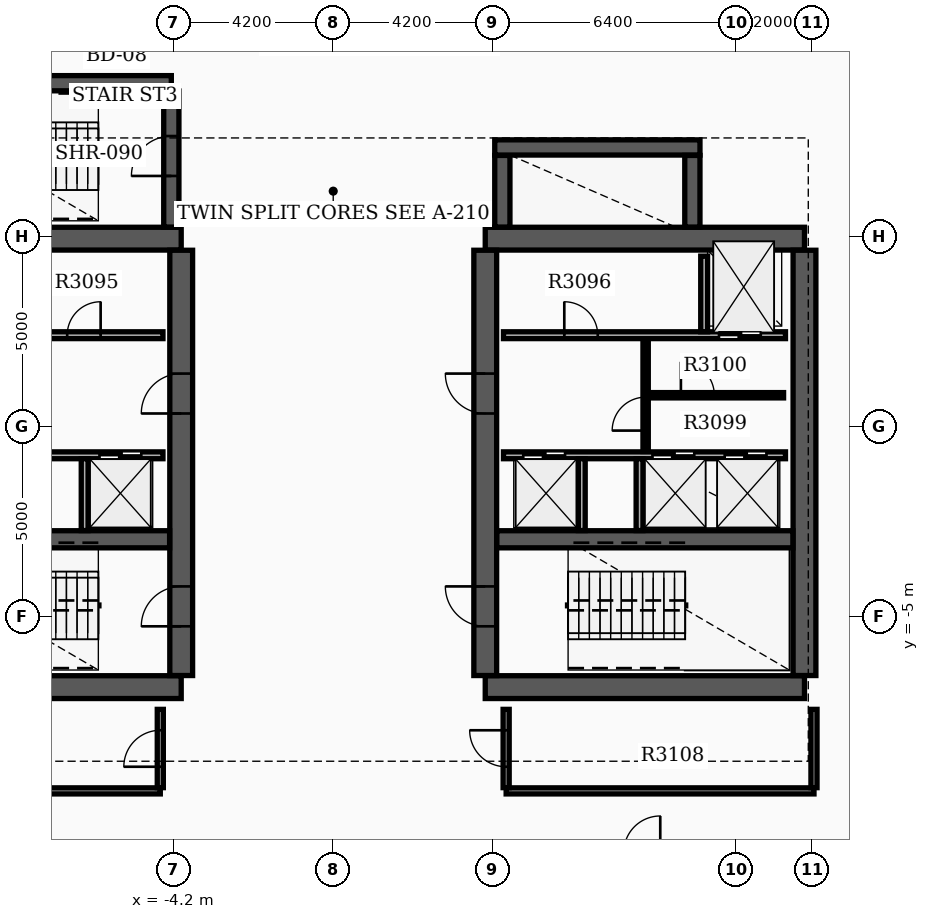
"""IFC4 building model, lengths in metres.
Left out: names, types, materials, properties, quantities, classifications, styles, units other than length and angle.
Written with IfcOpenShell. Run it as: python <this file> out.ifc"""

import sys

from ifc_helpers import new_model, si_unit, direction, frame, frame_2d, origin, place, context, subcontext, project, spatial, rectangle, extrude, element, fill, save


model = new_model("IFC4")
c1 = context("Model", 3, precision=1e-05, world=origin(), true_north=direction((0.0, 1.0)))
c2 = subcontext(c1, "Body", "Model", "MODEL_VIEW")
j1 = project(units=[si_unit("LENGTHUNIT", "METRE"), si_unit("PLANEANGLEUNIT", "RADIAN")], contexts=[c1])
p1 = place(None, origin())
s1 = spatial("IfcSite", under=j1, at=p1, CompositionType="ELEMENT")
p2 = place(p1, origin())
s2 = spatial("IfcBuilding", under=s1, at=p2, CompositionType="ELEMENT")
p3 = place(p2, frame((0.0, 0.0, 196.8)))
s3 = spatial("IfcBuildingStorey", under=s2, at=p3, CompositionType="ELEMENT", Elevation=196.8)
for number, where, z_axis, x_axis in (
    (1, (-12.4, -6.85, 0.0), (0.0, 0.0, 1.0), (1.0, 0.0, 0.0)),
    (2, (-12.4, 4.95, 0.0), (0.0, 0.0, 1.0), (1.0, 0.0, 0.0)),
):
    element("IfcWall", number, at=place(p3, frame(where, z_axis=z_axis, x_axis=x_axis)), inside=s3, PredefinedType="SHEAR", context=c2, shape_type="SweptSolid", body=[
        extrude(rectangle(XDim=8.4, YDim=0.6, at=frame_2d((4.2, 0.0))), origin(), (0.0, 0.0, 1.0), 4.3),
    ])
p4 = place(p3, frame((-4.0, -6.545, 0.0), z_axis=(0.0, 0.0, 1.0), x_axis=(0.0, 1.0, 0.0)))
e3 = element("IfcWall", 3, at=p4, inside=s3, PredefinedType="SHEAR", context=c2, shape_type="SweptSolid", body=[
    extrude(rectangle(XDim=11.19, YDim=0.6, at=frame_2d((5.595, 0.0))), origin(), (0.0, 0.0, 1.0), 4.3),
])
p5 = place(p4, frame((1.295, 0.0, 0.0)))
e4 = element("IfcOpeningElement", 4, at=p5, cuts=e3, PredefinedType="OPENING", context=c2, shape_type="SweptSolid", body=[
    extrude(rectangle(XDim=1.05, YDim=2.15, at=frame_2d((0.525, 1.075))), frame((0.0, 0.31, 0.0), z_axis=(0.0, -1.0, 0.0), x_axis=(1.0, 0.0, 0.0)), (0.0, 0.0, 1.0), 0.62),
])
p6 = place(p4, frame((6.895, 0.0, 0.0)))
e5 = element("IfcOpeningElement", 5, at=p6, cuts=e3, PredefinedType="OPENING", context=c2, shape_type="SweptSolid", body=[
    extrude(rectangle(XDim=1.05, YDim=2.15, at=frame_2d((0.525, 1.075))), frame((0.0, 0.31, 0.0), z_axis=(0.0, -1.0, 0.0), x_axis=(1.0, 0.0, 0.0)), (0.0, 0.0, 1.0), 0.62),
])
p7 = place(p3, frame((-12.095, -2.96, 0.0), z_axis=(0.0, 0.0, 1.0), x_axis=(1.0, 0.0, 0.0)))
e6 = element("IfcWall", 6, at=p7, inside=s3, PredefinedType="SHEAR", context=c2, shape_type="SweptSolid", body=[
    extrude(rectangle(XDim=7.79, YDim=0.45, at=frame_2d((3.895, 0.0))), origin(), (0.0, 0.0, 1.0), 4.3),
])
for number, where, z_axis, x_axis in (
    (7, (4.0, -6.85, 0.0), (0.0, 0.0, 1.0), (1.0, 0.0, 0.0)),
    (8, (4.0, 4.95, 0.0), (0.0, 0.0, 1.0), (1.0, 0.0, 0.0)),
):
    element("IfcWall", number, at=place(p3, frame(where, z_axis=z_axis, x_axis=x_axis)), inside=s3, PredefinedType="SHEAR", context=c2, shape_type="SweptSolid", body=[
        extrude(rectangle(XDim=8.4, YDim=0.6, at=frame_2d((4.2, 0.0))), origin(), (0.0, 0.0, 1.0), 4.3),
    ])
p8 = place(p3, frame((4.0, -6.545, 0.0), z_axis=(0.0, 0.0, 1.0), x_axis=(0.0, 1.0, 0.0)))
e9 = element("IfcWall", 9, at=p8, inside=s3, PredefinedType="SHEAR", context=c2, shape_type="SweptSolid", body=[
    extrude(rectangle(XDim=11.19, YDim=0.6, at=frame_2d((5.595, 0.0))), origin(), (0.0, 0.0, 1.0), 4.3),
])
p9 = place(p8, frame((1.295, 0.0, 0.0)))
e10 = element("IfcOpeningElement", 10, at=p9, cuts=e9, PredefinedType="OPENING", context=c2, shape_type="SweptSolid", body=[
    extrude(rectangle(XDim=1.05, YDim=2.15, at=frame_2d((0.525, 1.075))), frame((0.0, 0.31, 0.0), z_axis=(0.0, -1.0, 0.0), x_axis=(1.0, 0.0, 0.0)), (0.0, 0.0, 1.0), 0.62),
])
p10 = place(p8, frame((6.895, 0.0, 0.0)))
e11 = element("IfcOpeningElement", 11, at=p10, cuts=e9, PredefinedType="OPENING", context=c2, shape_type="SweptSolid", body=[
    extrude(rectangle(XDim=1.05, YDim=2.15, at=frame_2d((0.525, 1.075))), frame((0.0, 0.31, 0.0), z_axis=(0.0, -1.0, 0.0), x_axis=(1.0, 0.0, 0.0)), (0.0, 0.0, 1.0), 0.62),
])
p11 = place(p3, frame((12.4, -6.545, 0.0), z_axis=(0.0, 0.0, 1.0), x_axis=(0.0, 1.0, 0.0)))
e12 = element("IfcWall", 12, at=p11, inside=s3, PredefinedType="SHEAR", context=c2, shape_type="SweptSolid", body=[
    extrude(rectangle(XDim=11.19, YDim=0.6, at=frame_2d((5.595, 0.0))), origin(), (0.0, 0.0, 1.0), 4.3),
])
p12 = place(p3, frame((4.305, -2.96, 0.0), z_axis=(0.0, 0.0, 1.0), x_axis=(1.0, 0.0, 0.0)))
e13 = element("IfcWall", 13, at=p12, inside=s3, PredefinedType="SHEAR", context=c2, shape_type="SweptSolid", body=[
    extrude(rectangle(XDim=7.79, YDim=0.45, at=frame_2d((3.895, 0.0))), origin(), (0.0, 0.0, 1.0), 4.3),
])
p13 = place(p3, frame((-12.22, 9.04, 0.0), z_axis=(0.0, 0.0, 1.0), x_axis=(1.0, 0.0, 0.0)))
e14 = element("IfcWall", 14, at=p13, inside=s3, PredefinedType="SHEAR", context=c2, shape_type="SweptSolid", body=[
    extrude(rectangle(XDim=7.96, YDim=0.4, at=frame_2d((3.98, 0.0))), origin(), (0.0, 0.0, 1.0), 4.3),
])
p14 = place(p3, frame((-4.26, 5.255, 0.0), z_axis=(0.0, 0.0, 1.0), x_axis=(0.0, 1.0, 0.0)))
e15 = element("IfcWall", 15, at=p14, inside=s3, PredefinedType="SHEAR", context=c2, shape_type="SweptSolid", body=[
    extrude(rectangle(XDim=3.58, YDim=0.4, at=frame_2d((1.79, 0.0))), origin(), (0.0, 0.0, 1.0), 4.3),
])
p15 = place(p14, frame((1.345, 0.0, 0.0)))
e16 = element("IfcOpeningElement", 16, at=p15, cuts=e15, PredefinedType="OPENING", context=c2, shape_type="SweptSolid", body=[
    extrude(rectangle(XDim=1.05, YDim=2.15, at=frame_2d((0.525, 1.075))), frame((0.0, 0.21, 0.0), z_axis=(0.0, -1.0, 0.0), x_axis=(1.0, 0.0, 0.0)), (0.0, 0.0, 1.0), 0.42),
])
p16 = place(p3, frame((4.45, 5.255, 0.0), z_axis=(0.0, 0.0, 1.0), x_axis=(0.0, 1.0, 0.0)))
e17 = element("IfcWall", 17, at=p16, inside=s3, PredefinedType="SHEAR", context=c2, shape_type="SweptSolid", body=[
    extrude(rectangle(XDim=1.885, YDim=0.4, at=frame_2d((0.942, 0.0))), origin(), (0.0, 0.0, 1.0), 4.3),
])
p17 = place(p3, frame((4.25, 7.35, 0.0), z_axis=(0.0, 0.0, 1.0), x_axis=(1.0, 0.0, 0.0)))
e18 = element("IfcWall", 18, at=p17, inside=s3, PredefinedType="SHEAR", context=c2, shape_type="SweptSolid", body=[
    extrude(rectangle(XDim=5.4, YDim=0.4, at=frame_2d((2.7, 0.0))), origin(), (0.0, 0.0, 1.0), 4.3),
])
p18 = place(p3, frame((9.45, 5.255, 0.0), z_axis=(0.0, 0.0, 1.0), x_axis=(0.0, 1.0, 0.0)))
e19 = element("IfcWall", 19, at=p18, inside=s3, PredefinedType="SHEAR", context=c2, shape_type="SweptSolid", body=[
    extrude(rectangle(XDim=1.885, YDim=0.4, at=frame_2d((0.942, 0.0))), origin(), (0.0, 0.0, 1.0), 4.3),
])
p19 = place(p3, frame((-11.9, 2.41, 0.0), z_axis=(0.0, 0.0, 1.0), x_axis=(1.0, 0.0, 0.0)))
e20 = element("IfcWall", 20, at=p19, inside=s3, PredefinedType="SOLIDWALL", context=c2, shape_type="SweptSolid", body=[
    extrude(rectangle(XDim=7.42, YDim=0.18, at=frame_2d((3.71, 0.0))), origin(), (0.0, 0.0, 1.0), 3.37),
])
p20 = place(p19, frame((0.55, 0.0, 0.0)))
e21 = element("IfcOpeningElement", 21, at=p20, cuts=e20, PredefinedType="OPENING", context=c2, shape_type="SweptSolid", body=[
    extrude(rectangle(XDim=1.1, YDim=2.15, at=frame_2d((0.55, 1.075))), frame((0.0, 0.1, 0.0), z_axis=(0.0, -1.0, 0.0), x_axis=(1.0, 0.0, 0.0)), (0.0, 0.0, 1.0), 0.2),
])
p21 = place(p19, frame((4.9, 0.0, 0.0)))
e22 = element("IfcOpeningElement", 22, at=p21, cuts=e20, PredefinedType="OPENING", context=c2, shape_type="SweptSolid", body=[
    extrude(rectangle(XDim=0.88, YDim=2.1, at=frame_2d((0.44, 1.05))), frame((0.0, 0.1, 0.0), z_axis=(0.0, -1.0, 0.0), x_axis=(1.0, 0.0, 0.0)), (0.0, 0.0, 1.0), 0.2),
])
p22 = place(p3, frame((4.48, 2.41, 0.0), z_axis=(0.0, 0.0, 1.0), x_axis=(1.0, 0.0, 0.0)))
e23 = element("IfcWall", 23, at=p22, inside=s3, PredefinedType="SOLIDWALL", context=c2, shape_type="SweptSolid", body=[
    extrude(rectangle(XDim=7.42, YDim=0.18, at=frame_2d((3.71, 0.0))), origin(), (0.0, 0.0, 1.0), 3.37),
])
p23 = place(p22, frame((5.67, 0.0, 0.0)))
e24 = element("IfcOpeningElement", 24, at=p23, cuts=e23, PredefinedType="OPENING", context=c2, shape_type="SweptSolid", body=[
    extrude(rectangle(XDim=1.1, YDim=2.15, at=frame_2d((0.55, 1.075))), frame((0.0, 0.1, 0.0), z_axis=(0.0, -1.0, 0.0), x_axis=(1.0, 0.0, 0.0)), (0.0, 0.0, 1.0), 0.2),
])
p24 = place(p22, frame((1.6, 0.0, 0.0)))
e25 = element("IfcOpeningElement", 25, at=p24, cuts=e23, PredefinedType="OPENING", context=c2, shape_type="SweptSolid", body=[
    extrude(rectangle(XDim=0.88, YDim=2.1, at=frame_2d((0.44, 1.05))), frame((0.0, 0.1, 0.0), z_axis=(0.0, -1.0, 0.0), x_axis=(1.0, 0.0, 0.0)), (0.0, 0.0, 1.0), 0.2),
])
p25 = place(p3, frame((-11.9, -0.75, 0.0), z_axis=(0.0, 0.0, 1.0), x_axis=(1.0, 0.0, 0.0)))
e26 = element("IfcWall", 26, at=p25, inside=s3, PredefinedType="SOLIDWALL", context=c2, shape_type="SweptSolid", body=[
    extrude(rectangle(XDim=7.42, YDim=0.18, at=frame_2d((3.71, 0.0))), origin(), (0.0, 0.0, 1.0), 3.37),
])
p26 = place(p25, frame((0.45, 0.0, 0.0)))
e27 = element("IfcOpeningElement", 27, at=p26, cuts=e26, PredefinedType="OPENING", context=c2, shape_type="SweptSolid", body=[
    extrude(rectangle(XDim=1.1, YDim=2.15, at=frame_2d((0.55, 1.075))), frame((0.0, 0.1, 0.0), z_axis=(0.0, -1.0, 0.0), x_axis=(1.0, 0.0, 0.0)), (0.0, 0.0, 1.0), 0.2),
])
p27 = place(p25, frame((2.35, 0.0, 0.0)))
e28 = element("IfcOpeningElement", 28, at=p27, cuts=e26, PredefinedType="OPENING", context=c2, shape_type="SweptSolid", body=[
    extrude(rectangle(XDim=1.1, YDim=2.15, at=frame_2d((0.55, 1.075))), frame((0.0, 0.1, 0.0), z_axis=(0.0, -1.0, 0.0), x_axis=(1.0, 0.0, 0.0)), (0.0, 0.0, 1.0), 0.2),
])
p28 = place(p25, frame((5.75, 0.0, 0.0)))
e29 = element("IfcOpeningElement", 29, at=p28, cuts=e26, PredefinedType="OPENING", context=c2, shape_type="SweptSolid", body=[
    extrude(rectangle(XDim=1.1, YDim=2.15, at=frame_2d((0.55, 1.075))), frame((0.0, 0.1, 0.0), z_axis=(0.0, -1.0, 0.0), x_axis=(1.0, 0.0, 0.0)), (0.0, 0.0, 1.0), 0.2),
])
p29 = place(p3, frame((4.48, -0.75, 0.0), z_axis=(0.0, 0.0, 1.0), x_axis=(1.0, 0.0, 0.0)))
e30 = element("IfcWall", 30, at=p29, inside=s3, PredefinedType="SOLIDWALL", context=c2, shape_type="SweptSolid", body=[
    extrude(rectangle(XDim=7.42, YDim=0.18, at=frame_2d((3.71, 0.0))), origin(), (0.0, 0.0, 1.0), 3.37),
])
p30 = place(p29, frame((0.52, 0.0, 0.0)))
e31 = element("IfcOpeningElement", 31, at=p30, cuts=e30, PredefinedType="OPENING", context=c2, shape_type="SweptSolid", body=[
    extrude(rectangle(XDim=1.1, YDim=2.15, at=frame_2d((0.55, 1.075))), frame((0.0, 0.1, 0.0), z_axis=(0.0, -1.0, 0.0), x_axis=(1.0, 0.0, 0.0)), (0.0, 0.0, 1.0), 0.2),
])
p31 = place(p29, frame((3.92, 0.0, 0.0)))
e32 = element("IfcOpeningElement", 32, at=p31, cuts=e30, PredefinedType="OPENING", context=c2, shape_type="SweptSolid", body=[
    extrude(rectangle(XDim=1.1, YDim=2.15, at=frame_2d((0.55, 1.075))), frame((0.0, 0.1, 0.0), z_axis=(0.0, -1.0, 0.0), x_axis=(1.0, 0.0, 0.0)), (0.0, 0.0, 1.0), 0.2),
])
p32 = place(p29, frame((5.82, 0.0, 0.0)))
e33 = element("IfcOpeningElement", 33, at=p32, cuts=e30, PredefinedType="OPENING", context=c2, shape_type="SweptSolid", body=[
    extrude(rectangle(XDim=1.1, YDim=2.15, at=frame_2d((0.55, 1.075))), frame((0.0, 0.1, 0.0), z_axis=(0.0, -1.0, 0.0), x_axis=(1.0, 0.0, 0.0)), (0.0, 0.0, 1.0), 0.2),
])
p33 = place(p3, frame((9.76, 2.5, 0.0), z_axis=(0.0, 0.0, 1.0), x_axis=(0.0, 1.0, 0.0)))
e34 = element("IfcWall", 34, at=p33, inside=s3, PredefinedType="SOLIDWALL", context=c2, shape_type="SweptSolid", body=[
    extrude(rectangle(XDim=1.99, YDim=0.18, at=frame_2d((0.995, 0.0))), origin(), (0.0, 0.0, 1.0), 3.37),
])
for number, where, z_axis, x_axis in (
    (35, (-6.54, -2.73, 0.0), (0.0, 0.0, 1.0), (0.0, 1.0, 0.0)),
    (36, (6.54, -2.73, 0.0), (0.0, 0.0, 1.0), (0.0, 1.0, 0.0)),
    (37, (8.06, -2.73, 0.0), (0.0, 0.0, 1.0), (0.0, 1.0, 0.0)),
):
    element("IfcWall", number, at=place(p3, frame(where, z_axis=z_axis, x_axis=x_axis)), inside=s3, PredefinedType="SOLIDWALL", context=c2, shape_type="SweptSolid", body=[
        extrude(rectangle(XDim=1.89, YDim=0.18, at=frame_2d((0.945, 0.0))), origin(), (0.0, 0.0, 1.0), 3.37),
    ])
p34 = place(p3, frame((8.22, -0.65, 0.0), z_axis=(0.0, 0.0, 1.0), x_axis=(0.0, 1.0, 0.0)))
e38 = element("IfcWall", 38, at=p34, inside=s3, PredefinedType="SOLIDWALL", context=c2, shape_type="SweptSolid", body=[
    extrude(rectangle(XDim=2.96, YDim=0.14, at=frame_2d((1.48, 0.0))), origin(), (0.0, 0.0, 1.0), 3.37),
])
p35 = place(p34, frame((0.55, 0.0, 0.0)))
e39 = element("IfcOpeningElement", 39, at=p35, cuts=e38, PredefinedType="OPENING", context=c2, shape_type="SweptSolid", body=[
    extrude(rectangle(XDim=0.88, YDim=2.1, at=frame_2d((0.44, 1.05))), frame((0.0, 0.08, 0.0), z_axis=(0.0, -1.0, 0.0), x_axis=(1.0, 0.0, 0.0)), (0.0, 0.0, 1.0), 0.16),
])
p36 = place(p3, frame((8.298, 0.83, 0.0), z_axis=(0.0, 0.0, 1.0), x_axis=(1.0, 0.0, 0.0)))
e40 = element("IfcWall", 40, at=p36, inside=s3, PredefinedType="PARTITIONING", context=c2, shape_type="SweptSolid", body=[
    extrude(rectangle(XDim=3.552, YDim=0.14, at=frame_2d((1.776, 0.0))), origin(), (0.0, 0.0, 1.0), 3.37),
])
p37 = place(p36, frame((0.85, 0.0, 0.0)))
e41 = element("IfcOpeningElement", 41, at=p37, cuts=e40, PredefinedType="OPENING", context=c2, shape_type="SweptSolid", body=[
    extrude(rectangle(XDim=0.88, YDim=2.1, at=frame_2d((0.44, 1.05))), frame((0.0, 0.08, 0.0), z_axis=(0.0, -1.0, 0.0), x_axis=(1.0, 0.0, 0.0)), (0.0, 0.0, 1.0), 0.16),
])
p38 = place(p3, frame((4.55, -9.58, 0.0), z_axis=(0.0, 0.0, 1.0), x_axis=(1.0, 0.0, 0.0)))
e42 = element("IfcWall", 42, at=p38, inside=s3, PredefinedType="PARTITIONING", context=c2, shape_type="SweptSolid", body=[
    extrude(rectangle(XDim=8.1, YDim=0.16, at=frame_2d((4.05, 0.0))), origin(), (0.0, 0.0, 1.0), 3.37),
])
p39 = place(p3, frame((4.55, -9.495, 0.0), z_axis=(0.0, 0.0, 1.0), x_axis=(0.0, 1.0, 0.0)))
e43 = element("IfcWall", 43, at=p39, inside=s3, PredefinedType="PARTITIONING", context=c2, shape_type="SweptSolid", body=[
    extrude(rectangle(XDim=2.06, YDim=0.16, at=frame_2d((1.03, 0.0))), origin(), (0.0, 0.0, 1.0), 3.37),
])
p40 = place(p39, frame((0.55, 0.0, 0.0)))
e44 = element("IfcOpeningElement", 44, at=p40, cuts=e43, PredefinedType="OPENING", context=c2, shape_type="SweptSolid", body=[
    extrude(rectangle(XDim=0.96, YDim=2.15, at=frame_2d((0.48, 1.075))), frame((0.0, 0.09, 0.0), z_axis=(0.0, -1.0, 0.0), x_axis=(1.0, 0.0, 0.0)), (0.0, 0.0, 1.0), 0.18),
])
p41 = place(p3, frame((12.65, -9.495, 0.0), z_axis=(0.0, 0.0, 1.0), x_axis=(0.0, 1.0, 0.0)))
e45 = element("IfcWall", 45, at=p41, inside=s3, PredefinedType="PARTITIONING", context=c2, shape_type="SweptSolid", body=[
    extrude(rectangle(XDim=2.06, YDim=0.16, at=frame_2d((1.03, 0.0))), origin(), (0.0, 0.0, 1.0), 3.37),
])
p42 = place(p3, frame((-12.65, -9.58, 0.0), z_axis=(0.0, 0.0, 1.0), x_axis=(1.0, 0.0, 0.0)))
e46 = element("IfcWall", 46, at=p42, inside=s3, PredefinedType="PARTITIONING", context=c2, shape_type="SweptSolid", body=[
    extrude(rectangle(XDim=8.1, YDim=0.16, at=frame_2d((4.05, 0.0))), origin(), (0.0, 0.0, 1.0), 3.37),
])
p43 = place(p3, frame((-4.55, -9.495, 0.0), z_axis=(0.0, 0.0, 1.0), x_axis=(0.0, 1.0, 0.0)))
e47 = element("IfcWall", 47, at=p43, inside=s3, PredefinedType="PARTITIONING", context=c2, shape_type="SweptSolid", body=[
    extrude(rectangle(XDim=2.06, YDim=0.16, at=frame_2d((1.03, 0.0))), origin(), (0.0, 0.0, 1.0), 3.37),
])
p44 = place(p43, frame((0.55, 0.0, 0.0)))
e48 = element("IfcOpeningElement", 48, at=p44, cuts=e47, PredefinedType="OPENING", context=c2, shape_type="SweptSolid", body=[
    extrude(rectangle(XDim=0.96, YDim=2.15, at=frame_2d((0.48, 1.075))), frame((0.0, 0.09, 0.0), z_axis=(0.0, -1.0, 0.0), x_axis=(1.0, 0.0, 0.0)), (0.0, 0.0, 1.0), 0.18),
])
p45 = place(p5, origin())
e49 = element("IfcDoor", 49, at=p45, inside=s3, OperationType="SINGLE_SWING_LEFT", PredefinedType="DOOR", context=c2, shape_type="SweptSolid", body=[
    extrude(rectangle(XDim=1.05, YDim=2.15, at=frame_2d((0.525, 1.075))), frame((0.0, 0.025, 0.0), z_axis=(0.0, -1.0, 0.0), x_axis=(1.0, 0.0, 0.0)), (0.0, 0.0, 1.0), 0.05),
])
fill(e4, e49)
p46 = place(p9, origin())
e50 = element("IfcDoor", 50, at=p46, inside=s3, OperationType="SINGLE_SWING_RIGHT", PredefinedType="DOOR", context=c2, shape_type="SweptSolid", body=[
    extrude(rectangle(XDim=1.05, YDim=2.15, at=frame_2d((0.525, 1.075))), frame((0.0, 0.025, 0.0), z_axis=(0.0, -1.0, 0.0), x_axis=(1.0, 0.0, 0.0)), (0.0, 0.0, 1.0), 0.05),
])
fill(e10, e50)
p47 = place(p6, origin())
e51 = element("IfcDoor", 51, at=p47, inside=s3, OperationType="SINGLE_SWING_LEFT", PredefinedType="DOOR", context=c2, shape_type="SweptSolid", body=[
    extrude(rectangle(XDim=1.05, YDim=2.15, at=frame_2d((0.525, 1.075))), frame((0.0, 0.025, 0.0), z_axis=(0.0, -1.0, 0.0), x_axis=(1.0, 0.0, 0.0)), (0.0, 0.0, 1.0), 0.05),
])
fill(e5, e51)
p48 = place(p10, origin())
e52 = element("IfcDoor", 52, at=p48, inside=s3, OperationType="SINGLE_SWING_RIGHT", PredefinedType="DOOR", context=c2, shape_type="SweptSolid", body=[
    extrude(rectangle(XDim=1.05, YDim=2.15, at=frame_2d((0.525, 1.075))), frame((0.0, 0.025, 0.0), z_axis=(0.0, -1.0, 0.0), x_axis=(1.0, 0.0, 0.0)), (0.0, 0.0, 1.0), 0.05),
])
fill(e11, e52)
p49 = place(p15, origin())
e53 = element("IfcDoor", 53, at=p49, inside=s3, OperationType="SINGLE_SWING_LEFT", PredefinedType="DOOR", context=c2, shape_type="SweptSolid", body=[
    extrude(rectangle(XDim=1.05, YDim=2.15, at=frame_2d((0.525, 1.075))), frame((0.0, 0.025, 0.0), z_axis=(0.0, -1.0, 0.0), x_axis=(1.0, 0.0, 0.0)), (0.0, 0.0, 1.0), 0.05),
])
fill(e16, e53)
p50 = place(p23, origin())
e54 = element("IfcDoor", 54, at=p50, inside=s3, OperationType="DOUBLE_DOOR_SLIDING", PredefinedType="DOOR", context=c2, shape_type="SweptSolid", body=[
    extrude(rectangle(XDim=1.1, YDim=2.15, at=frame_2d((0.55, 1.075))), frame((0.0, 0.025, 0.0), z_axis=(0.0, -1.0, 0.0), x_axis=(1.0, 0.0, 0.0)), (0.0, 0.0, 1.0), 0.05),
])
fill(e24, e54)
p51 = place(p30, origin())
e55 = element("IfcDoor", 55, at=p51, inside=s3, OperationType="DOUBLE_DOOR_SLIDING", PredefinedType="DOOR", context=c2, shape_type="SweptSolid", body=[
    extrude(rectangle(XDim=1.1, YDim=2.15, at=frame_2d((0.55, 1.075))), frame((0.0, 0.025, 0.0), z_axis=(0.0, -1.0, 0.0), x_axis=(1.0, 0.0, 0.0)), (0.0, 0.0, 1.0), 0.05),
])
fill(e31, e55)
p52 = place(p28, origin())
e56 = element("IfcDoor", 56, at=p52, inside=s3, OperationType="DOUBLE_DOOR_SLIDING", PredefinedType="DOOR", context=c2, shape_type="SweptSolid", body=[
    extrude(rectangle(XDim=1.1, YDim=2.15, at=frame_2d((0.55, 1.075))), frame((0.0, 0.025, 0.0), z_axis=(0.0, -1.0, 0.0), x_axis=(1.0, 0.0, 0.0)), (0.0, 0.0, 1.0), 0.05),
])
fill(e29, e56)
p53 = place(p31, origin())
e57 = element("IfcDoor", 57, at=p53, inside=s3, OperationType="DOUBLE_DOOR_SLIDING", PredefinedType="DOOR", context=c2, shape_type="SweptSolid", body=[
    extrude(rectangle(XDim=1.1, YDim=2.15, at=frame_2d((0.55, 1.075))), frame((0.0, 0.025, 0.0), z_axis=(0.0, -1.0, 0.0), x_axis=(1.0, 0.0, 0.0)), (0.0, 0.0, 1.0), 0.05),
])
fill(e32, e57)
p54 = place(p32, origin())
e58 = element("IfcDoor", 58, at=p54, inside=s3, OperationType="DOUBLE_DOOR_SLIDING", PredefinedType="DOOR", context=c2, shape_type="SweptSolid", body=[
    extrude(rectangle(XDim=1.1, YDim=2.15, at=frame_2d((0.55, 1.075))), frame((0.0, 0.025, 0.0), z_axis=(0.0, -1.0, 0.0), x_axis=(1.0, 0.0, 0.0)), (0.0, 0.0, 1.0), 0.05),
])
fill(e33, e58)
p55 = place(p21, origin())
e59 = element("IfcDoor", 59, at=p55, inside=s3, OperationType="SINGLE_SWING_RIGHT", PredefinedType="DOOR", context=c2, shape_type="SweptSolid", body=[
    extrude(rectangle(XDim=0.88, YDim=2.1, at=frame_2d((0.44, 1.05))), frame((0.0, 0.025, 0.0), z_axis=(0.0, -1.0, 0.0), x_axis=(1.0, 0.0, 0.0)), (0.0, 0.0, 1.0), 0.05),
])
fill(e22, e59)
p56 = place(p24, origin())
e60 = element("IfcDoor", 60, at=p56, inside=s3, OperationType="SINGLE_SWING_LEFT", PredefinedType="DOOR", context=c2, shape_type="SweptSolid", body=[
    extrude(rectangle(XDim=0.88, YDim=2.1, at=frame_2d((0.44, 1.05))), frame((0.0, 0.025, 0.0), z_axis=(0.0, -1.0, 0.0), x_axis=(1.0, 0.0, 0.0)), (0.0, 0.0, 1.0), 0.05),
])
fill(e25, e60)
p57 = place(p35, origin())
e61 = element("IfcDoor", 61, at=p57, inside=s3, OperationType="SINGLE_SWING_LEFT", PredefinedType="DOOR", context=c2, shape_type="SweptSolid", body=[
    extrude(rectangle(XDim=0.88, YDim=2.1, at=frame_2d((0.44, 1.05))), frame((0.0, 0.025, 0.0), z_axis=(0.0, -1.0, 0.0), x_axis=(1.0, 0.0, 0.0)), (0.0, 0.0, 1.0), 0.05),
])
fill(e39, e61)
p58 = place(p37, origin())
e62 = element("IfcDoor", 62, at=p58, inside=s3, OperationType="SINGLE_SWING_LEFT", PredefinedType="DOOR", context=c2, shape_type="SweptSolid", body=[
    extrude(rectangle(XDim=0.88, YDim=2.1, at=frame_2d((0.44, 1.05))), frame((0.0, 0.025, 0.0), z_axis=(0.0, -1.0, 0.0), x_axis=(1.0, 0.0, 0.0)), (0.0, 0.0, 1.0), 0.05),
])
fill(e41, e62)
p59 = place(p40, origin())
e63 = element("IfcDoor", 63, at=p59, inside=s3, OperationType="SINGLE_SWING_RIGHT", PredefinedType="DOOR", context=c2, shape_type="SweptSolid", body=[
    extrude(rectangle(XDim=0.96, YDim=2.15, at=frame_2d((0.48, 1.075))), frame((0.0, 0.025, 0.0), z_axis=(0.0, -1.0, 0.0), x_axis=(1.0, 0.0, 0.0)), (0.0, 0.0, 1.0), 0.05),
])
fill(e44, e63)
p60 = place(p44, origin())
e64 = element("IfcDoor", 64, at=p60, inside=s3, OperationType="SINGLE_SWING_LEFT", PredefinedType="DOOR", context=c2, shape_type="SweptSolid", body=[
    extrude(rectangle(XDim=0.96, YDim=2.15, at=frame_2d((0.48, 1.075))), frame((0.0, 0.025, 0.0), z_axis=(0.0, -1.0, 0.0), x_axis=(1.0, 0.0, 0.0)), (0.0, 0.0, 1.0), 0.05),
])
fill(e48, e64)
save(model, sys.argv[1])
